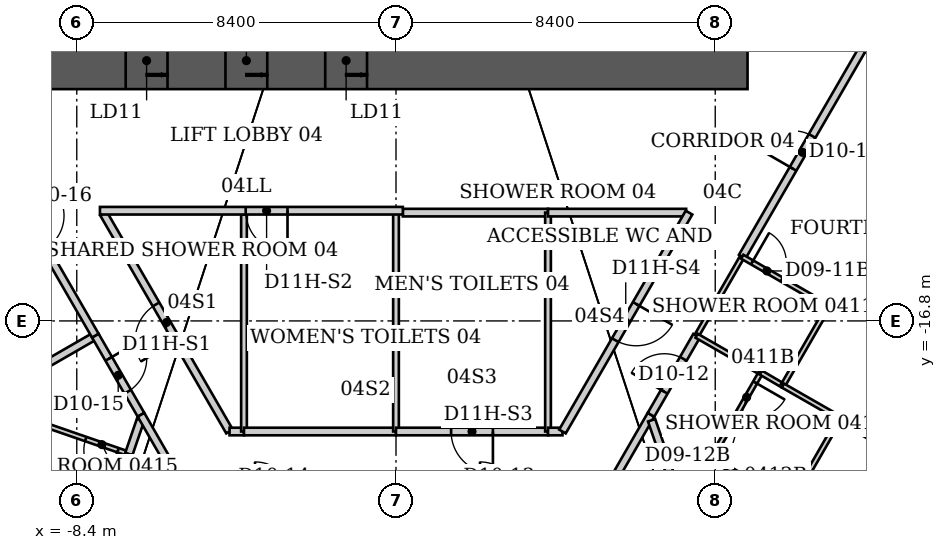
"""IFC4 building model, lengths in metres.
Left out: names, types, materials, properties, quantities, classifications, styles, units other than length and angle.
Written with IfcOpenShell. Run it as: python <this file> out.ifc"""

import sys

from ifc_helpers import new_model, si_unit, direction, frame, frame_2d, origin, place, context, subcontext, project, spatial, rectangle, extrude, element, fill, save


model = new_model("IFC4")
c1 = context("Model", 3, precision=1e-05, world=origin(), true_north=direction((0.0, 1.0)))
c2 = subcontext(c1, "Body", "Model", "MODEL_VIEW")
j1 = project(units=[si_unit("LENGTHUNIT", "METRE"), si_unit("PLANEANGLEUNIT", "RADIAN")], contexts=[c1])
p1 = place(None, origin())
s1 = spatial("IfcSite", under=j1, at=p1, CompositionType="ELEMENT")
p2 = place(p1, origin())
s2 = spatial("IfcBuilding", under=s1, at=p2, CompositionType="ELEMENT")
p3 = place(p2, frame((0.0, 0.0, 23.0)))
s3 = spatial("IfcBuildingStorey", under=s2, at=p3, CompositionType="ELEMENT", Elevation=23.0)
p4 = place(p3, frame((-9.25, -9.95, 0.0), z_axis=(0.0, 0.0, 1.0), x_axis=(1.0, 0.0, 0.0)))
e1 = element("IfcWall", 1, at=p4, inside=s3, PredefinedType="SHEAR", context=c2, shape_type="SweptSolid", body=[
    extrude(rectangle(XDim=18.5, YDim=1.5, at=frame_2d((9.25, 0.0))), origin(), (0.0, 0.0, 1.0), 3.8),
])
p5 = place(p4, frame((2.137, 0.0, 0.0)))
e2 = element("IfcOpeningElement", 2, at=p5, cuts=e1, PredefinedType="OPENING", context=c2, shape_type="SweptSolid", body=[
    extrude(rectangle(XDim=1.1, YDim=2.1, at=frame_2d((0.55, 1.05))), frame((0.0, 0.75, 0.0), z_axis=(0.0, -1.0, 0.0), x_axis=(1.0, 0.0, 0.0)), (0.0, 0.0, 1.0), 1.5),
])
p6 = place(p4, frame((4.762, 0.0, 0.0)))
e3 = element("IfcOpeningElement", 3, at=p6, cuts=e1, PredefinedType="OPENING", context=c2, shape_type="SweptSolid", body=[
    extrude(rectangle(XDim=1.1, YDim=2.1, at=frame_2d((0.55, 1.05))), frame((0.0, 0.75, 0.0), z_axis=(0.0, -1.0, 0.0), x_axis=(1.0, 0.0, 0.0)), (0.0, 0.0, 1.0), 1.5),
])
p7 = place(p4, frame((7.387, 0.0, 0.0)))
e4 = element("IfcOpeningElement", 4, at=p7, cuts=e1, PredefinedType="OPENING", context=c2, shape_type="SweptSolid", body=[
    extrude(rectangle(XDim=1.1, YDim=2.1, at=frame_2d((0.55, 1.05))), frame((0.0, 0.75, 0.0), z_axis=(0.0, -1.0, 0.0), x_axis=(1.0, 0.0, 0.0)), (0.0, 0.0, 1.0), 1.5),
])
p8 = place(p3, frame((-15.176, -21.38, 0.0), z_axis=(0.0, 0.0, 1.0), x_axis=(0.866276837306, 0.49956425127, 0.0)))
e5 = element("IfcWall", 5, at=p8, inside=s3, PredefinedType="PARTITIONING", context=c2, shape_type="SweptSolid", body=[
    extrude(rectangle(XDim=8.373, YDim=0.2, at=frame_2d((4.186, 0.0))), origin(), (0.0, 0.0, 1.0), 3.64),
])
p9 = place(p3, frame((-11.06, -11.74, 0.0), z_axis=(0.0, 0.0, 1.0), x_axis=(0.500384855356, -0.865803093394, 0.0)))
e6 = element("IfcWall", 6, at=p9, inside=s3, PredefinedType="PARTITIONING", context=c2, shape_type="SweptSolid", body=[
    extrude(rectangle(XDim=6.295, YDim=0.2, at=frame_2d((3.147, 0.0))), origin(), (0.0, 0.0, 1.0), 3.64),
])
p10 = place(p9, frame((2.647, 0.0, 0.0)))
e7 = element("IfcOpeningElement", 7, at=p10, cuts=e6, PredefinedType="OPENING", context=c2, shape_type="SweptSolid", body=[
    extrude(rectangle(XDim=1.0, YDim=2.13, at=frame_2d((0.5, 1.065))), frame((0.0, 0.1, 0.0), z_axis=(0.0, -1.0, 0.0), x_axis=(1.0, 0.0, 0.0)), (0.0, 0.0, 1.0), 0.2),
])
p11 = place(p3, frame((-7.91, -17.19, 0.0), z_axis=(0.0, 0.0, 1.0), x_axis=(0.499693115345, -0.866202511239, 0.0)))
e8 = element("IfcWall", 8, at=p11, inside=s3, PredefinedType="PARTITIONING", context=c2, shape_type="SweptSolid", body=[
    extrude(rectangle(XDim=2.401, YDim=0.2, at=frame_2d((1.201, 0.0))), origin(), (0.0, 0.0, 1.0), 3.64),
])
p12 = place(p11, frame((0.701, 0.0, 0.0)))
e9 = element("IfcOpeningElement", 9, at=p12, cuts=e8, PredefinedType="OPENING", context=c2, shape_type="SweptSolid", body=[
    extrude(rectangle(XDim=1.0, YDim=2.13, at=frame_2d((0.5, 1.065))), frame((0.0, 0.1, 0.0), z_axis=(0.0, -1.0, 0.0), x_axis=(1.0, 0.0, 0.0)), (0.0, 0.0, 1.0), 0.2),
])
p13 = place(p3, frame((-7.82, -22.57, 0.0), z_axis=(0.0, 0.0, 1.0), x_axis=(0.328693963496, 0.944436487203, 0.0)))
e10 = element("IfcWall", 10, at=p13, inside=s3, PredefinedType="PARTITIONING", context=c2, shape_type="SweptSolid", body=[
    extrude(rectangle(XDim=2.404, YDim=0.12, at=frame_2d((1.202, 0.0))), origin(), (0.0, 0.0, 1.0), 3.64),
])
p14 = place(p3, frame((-7.03, -20.3, 0.0), z_axis=(0.0, 0.0, 1.0), x_axis=(-0.94515546045, 0.326620813149, 0.0)))
e11 = element("IfcWall", 11, at=p14, inside=s3, PredefinedType="PARTITIONING", context=c2, shape_type="SweptSolid", body=[
    extrude(rectangle(XDim=2.603, YDim=0.12, at=frame_2d((1.301, 0.0))), origin(), (0.0, 0.0, 1.0), 3.64),
])
p15 = place(p14, frame((0.3, 0.0, 0.0)))
e12 = element("IfcOpeningElement", 12, at=p15, cuts=e11, PredefinedType="OPENING", context=c2, shape_type="SweptSolid", body=[
    extrude(rectangle(XDim=0.9, YDim=2.03, at=frame_2d((0.45, 1.015))), frame((0.0, 0.06, 0.0), z_axis=(0.0, -1.0, 0.0), x_axis=(1.0, 0.0, 0.0)), (0.0, 0.0, 1.0), 0.12),
])
p16 = place(p3, frame((-7.03, -20.3, 0.0), z_axis=(0.0, 0.0, 1.0), x_axis=(0.32487799312, 0.945755935528, 0.0)))
e13 = element("IfcWall", 13, at=p16, inside=s3, PredefinedType="PARTITIONING", context=c2, shape_type="SweptSolid", body=[
    extrude(rectangle(XDim=0.947, YDim=0.2, at=frame_2d((0.473, 0.0))), origin(), (0.0, 0.0, 1.0), 3.64),
])
p17 = place(p3, frame((-5.42, -21.51, 0.0), z_axis=(0.0, 0.0, 1.0), x_axis=(-0.499065468721, 0.866564283784, 0.0)))
e14 = element("IfcWall", 14, at=p17, inside=s3, PredefinedType="PARTITIONING", context=c2, shape_type="SweptSolid", body=[
    extrude(rectangle(XDim=2.585, YDim=0.2, at=frame_2d((1.292, 0.0))), origin(), (0.0, 0.0, 1.0), 3.64),
])
p18 = place(p3, frame((-4.38, -19.71, 0.0), z_axis=(0.0, 0.0, 1.0), x_axis=(-0.500523653757, 0.865722860984, 0.0)))
e15 = element("IfcWall", 15, at=p18, inside=s3, PredefinedType="PARTITIONING", context=c2, shape_type="SweptSolid", body=[
    extrude(rectangle(XDim=6.628, YDim=0.2, at=frame_2d((3.314, 0.0))), origin(), (0.0, 0.0, 1.0), 3.64),
])
p19 = place(p18, frame((2.764, 0.0, 0.0)))
e16 = element("IfcOpeningElement", 16, at=p19, cuts=e15, PredefinedType="OPENING", context=c2, shape_type="SweptSolid", body=[
    extrude(rectangle(XDim=1.1, YDim=2.2, at=frame_2d((0.55, 1.1))), frame((0.0, 0.1, 0.0), z_axis=(0.0, -1.0, 0.0), x_axis=(1.0, 0.0, 0.0)), (0.0, 0.0, 1.0), 0.2),
])
p20 = place(p3, frame((-4.0, -19.71, 0.0), z_axis=(0.0, 0.0, 1.0), x_axis=(-1.0, 0.0, 0.0)))
e17 = element("IfcWall", 17, at=p20, inside=s3, PredefinedType="PARTITIONING", context=c2, shape_type="SweptSolid", body=[
    extrude(rectangle(XDim=0.38, YDim=0.2, at=frame_2d((0.19, 0.0))), origin(), (0.0, 0.0, 1.0), 3.64),
])
p21 = place(p3, frame((-4.0, -14.0, 0.0), z_axis=(0.0, 0.0, 1.0), x_axis=(0.0, -1.0, 0.0)))
e18 = element("IfcWall", 18, at=p21, inside=s3, PredefinedType="PARTITIONING", context=c2, shape_type="SweptSolid", body=[
    extrude(rectangle(XDim=5.71, YDim=0.15, at=frame_2d((2.855, 0.0))), origin(), (0.0, 0.0, 1.0), 3.64),
])
p22 = place(p3, frame((0.0, -19.71, 0.0), z_axis=(0.0, 0.0, 1.0), x_axis=(-1.0, 0.0, 0.0)))
e19 = element("IfcWall", 19, at=p22, inside=s3, PredefinedType="PARTITIONING", context=c2, shape_type="SweptSolid", body=[
    extrude(rectangle(XDim=4.0, YDim=0.2, at=frame_2d((2.0, 0.0))), origin(), (0.0, 0.0, 1.0), 3.64),
])
p23 = place(p3, frame((0.0, -13.95, 0.0), z_axis=(0.0, 0.0, 1.0), x_axis=(0.0, -1.0, 0.0)))
e20 = element("IfcWall", 20, at=p23, inside=s3, PredefinedType="PARTITIONING", context=c2, shape_type="SweptSolid", body=[
    extrude(rectangle(XDim=5.76, YDim=0.15, at=frame_2d((2.88, 0.0))), origin(), (0.0, 0.0, 1.0), 2.86),
])
p24 = place(p3, frame((0.18, -13.95, 0.0), z_axis=(0.0, 0.0, 1.0), x_axis=(1.0, 0.0, 0.0)))
e21 = element("IfcWall", 21, at=p24, inside=s3, PredefinedType="PARTITIONING", context=c2, shape_type="SweptSolid", body=[
    extrude(rectangle(XDim=3.82, YDim=0.2, at=frame_2d((1.91, 0.0))), origin(), (0.0, 0.0, 1.0), 3.64),
])
p25 = place(p3, frame((0.18, -13.9, 0.0), z_axis=(0.0, 0.0, 1.0), x_axis=(-1.0, 0.0, 0.0)))
e22 = element("IfcWall", 22, at=p25, inside=s3, PredefinedType="PARTITIONING", context=c2, shape_type="SweptSolid", body=[
    extrude(rectangle(XDim=7.97, YDim=0.2, at=frame_2d((3.985, 0.0))), origin(), (0.0, 0.0, 1.0), 3.64),
])
p26 = place(p25, frame((3.035, 0.0, 0.0)))
e23 = element("IfcOpeningElement", 23, at=p26, cuts=e22, PredefinedType="OPENING", context=c2, shape_type="SweptSolid", body=[
    extrude(rectangle(XDim=1.1, YDim=2.2, at=frame_2d((0.55, 1.1))), frame((0.0, 0.1, 0.0), z_axis=(0.0, -1.0, 0.0), x_axis=(1.0, 0.0, 0.0)), (0.0, 0.0, 1.0), 0.2),
])
p27 = place(p3, frame((4.0, -19.71, 0.0), z_axis=(0.0, 0.0, 1.0), x_axis=(-1.0, 0.0, 0.0)))
e24 = element("IfcWall", 24, at=p27, inside=s3, PredefinedType="PARTITIONING", context=c2, shape_type="SweptSolid", body=[
    extrude(rectangle(XDim=4.0, YDim=0.2, at=frame_2d((2.0, 0.0))), origin(), (0.0, 0.0, 1.0), 3.64),
])
p28 = place(p27, frame((1.45, 0.0, 0.0)))
e25 = element("IfcOpeningElement", 25, at=p28, cuts=e24, PredefinedType="OPENING", context=c2, shape_type="SweptSolid", body=[
    extrude(rectangle(XDim=1.1, YDim=2.2, at=frame_2d((0.55, 1.1))), frame((0.0, 0.1, 0.0), z_axis=(0.0, -1.0, 0.0), x_axis=(1.0, 0.0, 0.0)), (0.0, 0.0, 1.0), 0.2),
])
p29 = place(p3, frame((4.0, -13.95, 0.0), z_axis=(0.0, 0.0, 1.0), x_axis=(0.0, -1.0, 0.0)))
e26 = element("IfcWall", 26, at=p29, inside=s3, PredefinedType="PARTITIONING", context=c2, shape_type="SweptSolid", body=[
    extrude(rectangle(XDim=5.76, YDim=0.15, at=frame_2d((2.88, 0.0))), origin(), (0.0, 0.0, 1.0), 3.64),
])
p30 = place(p3, frame((4.0, -13.95, 0.0), z_axis=(0.0, 0.0, 1.0), x_axis=(1.0, 0.0, 0.0)))
e27 = element("IfcWall", 27, at=p30, inside=s3, PredefinedType="PARTITIONING", context=c2, shape_type="SweptSolid", body=[
    extrude(rectangle(XDim=3.635, YDim=0.2, at=frame_2d((1.817, 0.0))), origin(), (0.0, 0.0, 1.0), 3.64),
])
p31 = place(p3, frame((4.38, -19.71, 0.0), z_axis=(0.0, 0.0, 1.0), x_axis=(-1.0, 0.0, 0.0)))
e28 = element("IfcWall", 28, at=p31, inside=s3, PredefinedType="PARTITIONING", context=c2, shape_type="SweptSolid", body=[
    extrude(rectangle(XDim=0.38, YDim=0.2, at=frame_2d((0.19, 0.0))), origin(), (0.0, 0.0, 1.0), 3.64),
])
p32 = place(p3, frame((6.71, -19.27, 0.0), z_axis=(0.0, 0.0, 1.0), x_axis=(-0.499065468721, -0.866564283784, 0.0)))
e29 = element("IfcWall", 29, at=p32, inside=s3, PredefinedType="PARTITIONING", context=c2, shape_type="SweptSolid", body=[
    extrude(rectangle(XDim=2.585, YDim=0.2, at=frame_2d((1.292, 0.0))), origin(), (0.0, 0.0, 1.0), 3.64),
])
p33 = place(p3, frame((6.71, -19.27, 0.0), z_axis=(0.0, 0.0, 1.0), x_axis=(0.499693115345, 0.866202511239, 0.0)))
e30 = element("IfcWall", 30, at=p33, inside=s3, PredefinedType="PARTITIONING", context=c2, shape_type="SweptSolid", body=[
    extrude(rectangle(XDim=2.401, YDim=0.2, at=frame_2d((1.201, 0.0))), origin(), (0.0, 0.0, 1.0), 3.64),
])
p34 = place(p33, frame((0.701, 0.0, 0.0)))
e31 = element("IfcOpeningElement", 31, at=p34, cuts=e30, PredefinedType="OPENING", context=c2, shape_type="SweptSolid", body=[
    extrude(rectangle(XDim=1.0, YDim=2.13, at=frame_2d((0.5, 1.065))), frame((0.0, 0.1, 0.0), z_axis=(0.0, -1.0, 0.0), x_axis=(1.0, 0.0, 0.0)), (0.0, 0.0, 1.0), 0.2),
])
p35 = place(p3, frame((6.726, -19.414, 0.0), z_axis=(0.0, 0.0, 1.0), x_axis=(0.326258175708, -0.945280700524, 0.0)))
e32 = element("IfcWall", 32, at=p35, inside=s3, PredefinedType="PARTITIONING", context=c2, shape_type="SweptSolid", body=[
    extrude(rectangle(XDim=2.588, YDim=0.2, at=frame_2d((1.294, 0.0))), origin(), (0.0, 0.0, 1.0), 3.64),
])
p36 = place(p3, frame((7.71, -13.95, 0.0), z_axis=(0.0, 0.0, 1.0), x_axis=(-0.500511113963, -0.865730110831, 0.0)))
e33 = element("IfcWall", 33, at=p36, inside=s3, PredefinedType="PARTITIONING", context=c2, shape_type="SweptSolid", body=[
    extrude(rectangle(XDim=6.653, YDim=0.2, at=frame_2d((3.327, 0.0))), origin(), (0.0, 0.0, 1.0), 3.64),
])
p37 = place(p36, frame((2.777, 0.0, 0.0)))
e34 = element("IfcOpeningElement", 34, at=p37, cuts=e33, PredefinedType="OPENING", context=c2, shape_type="SweptSolid", body=[
    extrude(rectangle(XDim=1.1, YDim=2.2, at=frame_2d((0.55, 1.1))), frame((0.0, 0.1, 0.0), z_axis=(0.0, -1.0, 0.0), x_axis=(1.0, 0.0, 0.0)), (0.0, 0.0, 1.0), 0.2),
])
p38 = place(p3, frame((7.91, -17.19, 0.0), z_axis=(0.0, 0.0, 1.0), x_axis=(0.499737123639, 0.866177122335, 0.0)))
e35 = element("IfcWall", 35, at=p38, inside=s3, PredefinedType="PARTITIONING", context=c2, shape_type="SweptSolid", body=[
    extrude(rectangle(XDim=2.401, YDim=0.12, at=frame_2d((1.201, 0.0))), origin(), (0.0, 0.0, 1.0), 3.64),
])
p39 = place(p3, frame((7.91, -17.19, 0.0), z_axis=(0.0, 0.0, 1.0), x_axis=(0.8673242112, -0.497743621421, 0.0)))
e36 = element("IfcWall", 36, at=p39, inside=s3, PredefinedType="PARTITIONING", context=c2, shape_type="SweptSolid", body=[
    extrude(rectangle(XDim=1.949, YDim=0.12, at=frame_2d((0.974, 0.0))), origin(), (0.0, 0.0, 1.0), 3.64),
])
p40 = place(p3, frame((8.3, -20.42, 0.0), z_axis=(0.0, 0.0, 1.0), x_axis=(0.866177122335, -0.499737123639, 0.0)))
e37 = element("IfcWall", 37, at=p40, inside=s3, PredefinedType="PARTITIONING", context=c2, shape_type="SweptSolid", body=[
    extrude(rectangle(XDim=2.401, YDim=0.12, at=frame_2d((1.201, 0.0))), origin(), (0.0, 0.0, 1.0), 3.64),
])
p41 = place(p3, frame((9.11, -15.11, 0.0), z_axis=(0.0, 0.0, 1.0), x_axis=(0.500872436665, 0.86552111597, 0.0)))
e38 = element("IfcWall", 38, at=p41, inside=s3, PredefinedType="PARTITIONING", context=c2, shape_type="SweptSolid", body=[
    extrude(rectangle(XDim=6.344, YDim=0.2, at=frame_2d((3.172, 0.0))), origin(), (0.0, 0.0, 1.0), 3.64),
])
p42 = place(p41, frame((2.672, 0.0, 0.0)))
e39 = element("IfcOpeningElement", 39, at=p42, cuts=e38, PredefinedType="OPENING", context=c2, shape_type="SweptSolid", body=[
    extrude(rectangle(XDim=1.0, YDim=2.13, at=frame_2d((0.5, 1.065))), frame((0.0, 0.1, 0.0), z_axis=(0.0, -1.0, 0.0), x_axis=(1.0, 0.0, 0.0)), (0.0, 0.0, 1.0), 0.2),
])
p43 = place(p3, frame((9.6, -18.16, 0.0), z_axis=(0.0, 0.0, 1.0), x_axis=(-0.498627694264, -0.866816256489, 0.0)))
e40 = element("IfcWall", 40, at=p43, inside=s3, PredefinedType="PARTITIONING", context=c2, shape_type="SweptSolid", body=[
    extrude(rectangle(XDim=2.607, YDim=0.12, at=frame_2d((1.304, 0.0))), origin(), (0.0, 0.0, 1.0), 3.64),
])
p44 = place(p43, frame((0.3, 0.0, 0.0)))
e41 = element("IfcOpeningElement", 41, at=p44, cuts=e40, PredefinedType="OPENING", context=c2, shape_type="SweptSolid", body=[
    extrude(rectangle(XDim=0.9, YDim=2.03, at=frame_2d((0.45, 1.015))), frame((0.0, 0.06, 0.0), z_axis=(0.0, -1.0, 0.0), x_axis=(1.0, 0.0, 0.0)), (0.0, 0.0, 1.0), 0.12),
])
p45 = place(p3, frame((9.6, -18.16, 0.0), z_axis=(0.0, 0.0, 1.0), x_axis=(0.862577739272, -0.505924543497, 0.0)))
e42 = element("IfcWall", 42, at=p45, inside=s3, PredefinedType="PARTITIONING", context=c2, shape_type="SweptSolid", body=[
    extrude(rectangle(XDim=0.672, YDim=0.12, at=frame_2d((0.336, 0.0))), origin(), (0.0, 0.0, 1.0), 3.64),
])
p46 = place(p3, frame((10.18, -18.5, 0.0), z_axis=(0.0, 0.0, 1.0), x_axis=(0.499693115345, 0.866202511239, 0.0)))
e43 = element("IfcWall", 43, at=p46, inside=s3, PredefinedType="PARTITIONING", context=c2, shape_type="SweptSolid", body=[
    extrude(rectangle(XDim=2.401, YDim=0.12, at=frame_2d((1.201, 0.0))), origin(), (0.0, 0.0, 1.0), 3.64),
])
p47 = place(p3, frame((10.18, -18.5, 0.0), z_axis=(0.0, 0.0, 1.0), x_axis=(0.867564547129, -0.497324598794, 0.0)))
e44 = element("IfcWall", 44, at=p47, inside=s3, PredefinedType="PARTITIONING", context=c2, shape_type="SweptSolid", body=[
    extrude(rectangle(XDim=1.729, YDim=0.12, at=frame_2d((0.865, 0.0))), origin(), (0.0, 0.0, 1.0), 3.64),
])
p48 = place(p3, frame((10.38, -21.62, 0.0), z_axis=(0.0, 0.0, 1.0), x_axis=(0.498627694264, 0.866816256489, 0.0)))
e45 = element("IfcWall", 45, at=p48, inside=s3, PredefinedType="PARTITIONING", context=c2, shape_type="SweptSolid", body=[
    extrude(rectangle(XDim=2.607, YDim=0.12, at=frame_2d((1.304, 0.0))), origin(), (0.0, 0.0, 1.0), 3.64),
])
p49 = place(p3, frame((11.38, -16.42, 0.0), z_axis=(0.0, 0.0, 1.0), x_axis=(-0.866154567199, 0.49977621564, 0.0)))
e46 = element("IfcWall", 46, at=p49, inside=s3, PredefinedType="PARTITIONING", context=c2, shape_type="SweptSolid", body=[
    extrude(rectangle(XDim=2.621, YDim=0.12, at=frame_2d((1.311, 0.0))), origin(), (0.0, 0.0, 1.0), 2.878),
])
p50 = place(p49, frame((1.421, 0.0, 0.0)))
e47 = element("IfcOpeningElement", 47, at=p50, cuts=e46, PredefinedType="OPENING", context=c2, shape_type="SweptSolid", body=[
    extrude(rectangle(XDim=0.9, YDim=2.03, at=frame_2d((0.45, 1.015))), frame((0.0, 0.06, 0.0), z_axis=(0.0, -1.0, 0.0), x_axis=(1.0, 0.0, 0.0)), (0.0, 0.0, 1.0), 0.12),
])
p51 = place(p3, frame((11.68, -19.36, 0.0), z_axis=(0.0, 0.0, 1.0), x_axis=(0.865885444553, -0.500242338183, 0.0)))
e48 = element("IfcWall", 48, at=p51, inside=s3, PredefinedType="PARTITIONING", context=c2, shape_type="SweptSolid", body=[
    extrude(rectangle(XDim=4.038, YDim=0.2, at=frame_2d((2.019, 0.0))), origin(), (0.0, 0.0, 1.0), 3.64),
])
p52 = place(p3, frame((12.29, -9.62, 0.0), z_axis=(0.0, 0.0, 1.0), x_axis=(0.865987003449, -0.500066505434, 0.0)))
e49 = element("IfcWall", 49, at=p52, inside=s3, PredefinedType="PARTITIONING", context=c2, shape_type="SweptSolid", body=[
    extrude(rectangle(XDim=2.621, YDim=0.12, at=frame_2d((1.311, 0.0))), origin(), (0.0, 0.0, 1.0), 3.038),
])
p53 = place(p42, origin())
e50 = element("IfcDoor", 50, at=p53, inside=s3, OperationType="SINGLE_SWING_LEFT", PredefinedType="DOOR", context=c2, shape_type="SweptSolid", body=[
    extrude(rectangle(XDim=1.0, YDim=2.13, at=frame_2d((0.5, 1.065))), frame((0.0, 0.025, 0.0), z_axis=(0.0, -1.0, 0.0), x_axis=(1.0, 0.0, 0.0)), (0.0, 0.0, 1.0), 0.05),
])
fill(e39, e50)
p54 = place(p50, origin())
e51 = element("IfcDoor", 51, at=p54, inside=s3, OperationType="SINGLE_SWING_RIGHT", PredefinedType="DOOR", context=c2, shape_type="SweptSolid", body=[
    extrude(rectangle(XDim=0.9, YDim=2.03, at=frame_2d((0.45, 1.015))), frame((0.0, 0.025, 0.0), z_axis=(0.0, -1.0, 0.0), x_axis=(1.0, 0.0, 0.0)), (0.0, 0.0, 1.0), 0.05),
])
fill(e47, e51)
p55 = place(p34, origin())
e52 = element("IfcDoor", 52, at=p55, inside=s3, OperationType="SINGLE_SWING_LEFT", PredefinedType="DOOR", context=c2, shape_type="SweptSolid", body=[
    extrude(rectangle(XDim=1.0, YDim=2.13, at=frame_2d((0.5, 1.065))), frame((0.0, 0.025, 0.0), z_axis=(0.0, -1.0, 0.0), x_axis=(1.0, 0.0, 0.0)), (0.0, 0.0, 1.0), 0.05),
])
fill(e31, e52)
p56 = place(p44, origin())
e53 = element("IfcDoor", 53, at=p56, inside=s3, OperationType="SINGLE_SWING_LEFT", PredefinedType="DOOR", context=c2, shape_type="SweptSolid", body=[
    extrude(rectangle(XDim=0.9, YDim=2.03, at=frame_2d((0.45, 1.015))), frame((0.0, 0.025, 0.0), z_axis=(0.0, -1.0, 0.0), x_axis=(1.0, 0.0, 0.0)), (0.0, 0.0, 1.0), 0.05),
])
fill(e41, e53)
p57 = place(p12, origin())
e54 = element("IfcDoor", 54, at=p57, inside=s3, OperationType="SINGLE_SWING_LEFT", PredefinedType="DOOR", context=c2, shape_type="SweptSolid", body=[
    extrude(rectangle(XDim=1.0, YDim=2.13, at=frame_2d((0.5, 1.065))), frame((0.0, 0.025, 0.0), z_axis=(0.0, -1.0, 0.0), x_axis=(1.0, 0.0, 0.0)), (0.0, 0.0, 1.0), 0.05),
])
fill(e9, e54)
p58 = place(p15, origin())
e55 = element("IfcDoor", 55, at=p58, inside=s3, OperationType="SINGLE_SWING_LEFT", PredefinedType="DOOR", context=c2, shape_type="SweptSolid", body=[
    extrude(rectangle(XDim=0.9, YDim=2.03, at=frame_2d((0.45, 1.015))), frame((0.0, 0.025, 0.0), z_axis=(0.0, -1.0, 0.0), x_axis=(1.0, 0.0, 0.0)), (0.0, 0.0, 1.0), 0.05),
])
fill(e12, e55)
p59 = place(p19, origin())
e56 = element("IfcDoor", 56, at=p59, inside=s3, OperationType="SINGLE_SWING_LEFT", PredefinedType="DOOR", context=c2, shape_type="SweptSolid", body=[
    extrude(rectangle(XDim=1.1, YDim=2.2, at=frame_2d((0.55, 1.1))), frame((0.0, 0.025, 0.0), z_axis=(0.0, -1.0, 0.0), x_axis=(1.0, 0.0, 0.0)), (0.0, 0.0, 1.0), 0.05),
])
fill(e16, e56)
p60 = place(p26, origin())
e57 = element("IfcDoor", 57, at=p60, inside=s3, OperationType="SINGLE_SWING_LEFT", PredefinedType="DOOR", context=c2, shape_type="SweptSolid", body=[
    extrude(rectangle(XDim=1.1, YDim=2.2, at=frame_2d((0.55, 1.1))), frame((0.0, 0.025, 0.0), z_axis=(0.0, -1.0, 0.0), x_axis=(1.0, 0.0, 0.0)), (0.0, 0.0, 1.0), 0.05),
])
fill(e23, e57)
p61 = place(p28, origin())
e58 = element("IfcDoor", 58, at=p61, inside=s3, OperationType="SINGLE_SWING_LEFT", PredefinedType="DOOR", context=c2, shape_type="SweptSolid", body=[
    extrude(rectangle(XDim=1.1, YDim=2.2, at=frame_2d((0.55, 1.1))), frame((0.0, 0.025, 0.0), z_axis=(0.0, -1.0, 0.0), x_axis=(1.0, 0.0, 0.0)), (0.0, 0.0, 1.0), 0.05),
])
fill(e25, e58)
p62 = place(p37, origin())
e59 = element("IfcDoor", 59, at=p62, inside=s3, OperationType="SINGLE_SWING_LEFT", PredefinedType="DOOR", context=c2, shape_type="SweptSolid", body=[
    extrude(rectangle(XDim=1.1, YDim=2.2, at=frame_2d((0.55, 1.1))), frame((0.0, 0.025, 0.0), z_axis=(0.0, -1.0, 0.0), x_axis=(1.0, 0.0, 0.0)), (0.0, 0.0, 1.0), 0.05),
])
fill(e34, e59)
p63 = place(p5, origin())
e60 = element("IfcDoor", 60, at=p63, inside=s3, OperationType="DOUBLE_DOOR_SLIDING", PredefinedType="DOOR", context=c2, shape_type="SweptSolid", body=[
    extrude(rectangle(XDim=1.1, YDim=2.1, at=frame_2d((0.55, 1.05))), frame((0.0, 0.025, 0.0), z_axis=(0.0, -1.0, 0.0), x_axis=(1.0, 0.0, 0.0)), (0.0, 0.0, 1.0), 0.05),
])
fill(e2, e60)
p64 = place(p6, origin())
e61 = element("IfcDoor", 61, at=p64, inside=s3, OperationType="DOUBLE_DOOR_SLIDING", PredefinedType="DOOR", context=c2, shape_type="SweptSolid", body=[
    extrude(rectangle(XDim=1.1, YDim=2.1, at=frame_2d((0.55, 1.05))), frame((0.0, 0.025, 0.0), z_axis=(0.0, -1.0, 0.0), x_axis=(1.0, 0.0, 0.0)), (0.0, 0.0, 1.0), 0.05),
])
fill(e3, e61)
p65 = place(p7, origin())
e62 = element("IfcDoor", 62, at=p65, inside=s3, OperationType="DOUBLE_DOOR_SLIDING", PredefinedType="DOOR", context=c2, shape_type="SweptSolid", body=[
    extrude(rectangle(XDim=1.1, YDim=2.1, at=frame_2d((0.55, 1.05))), frame((0.0, 0.025, 0.0), z_axis=(0.0, -1.0, 0.0), x_axis=(1.0, 0.0, 0.0)), (0.0, 0.0, 1.0), 0.05),
])
fill(e4, e62)
save(model, sys.argv[1])
